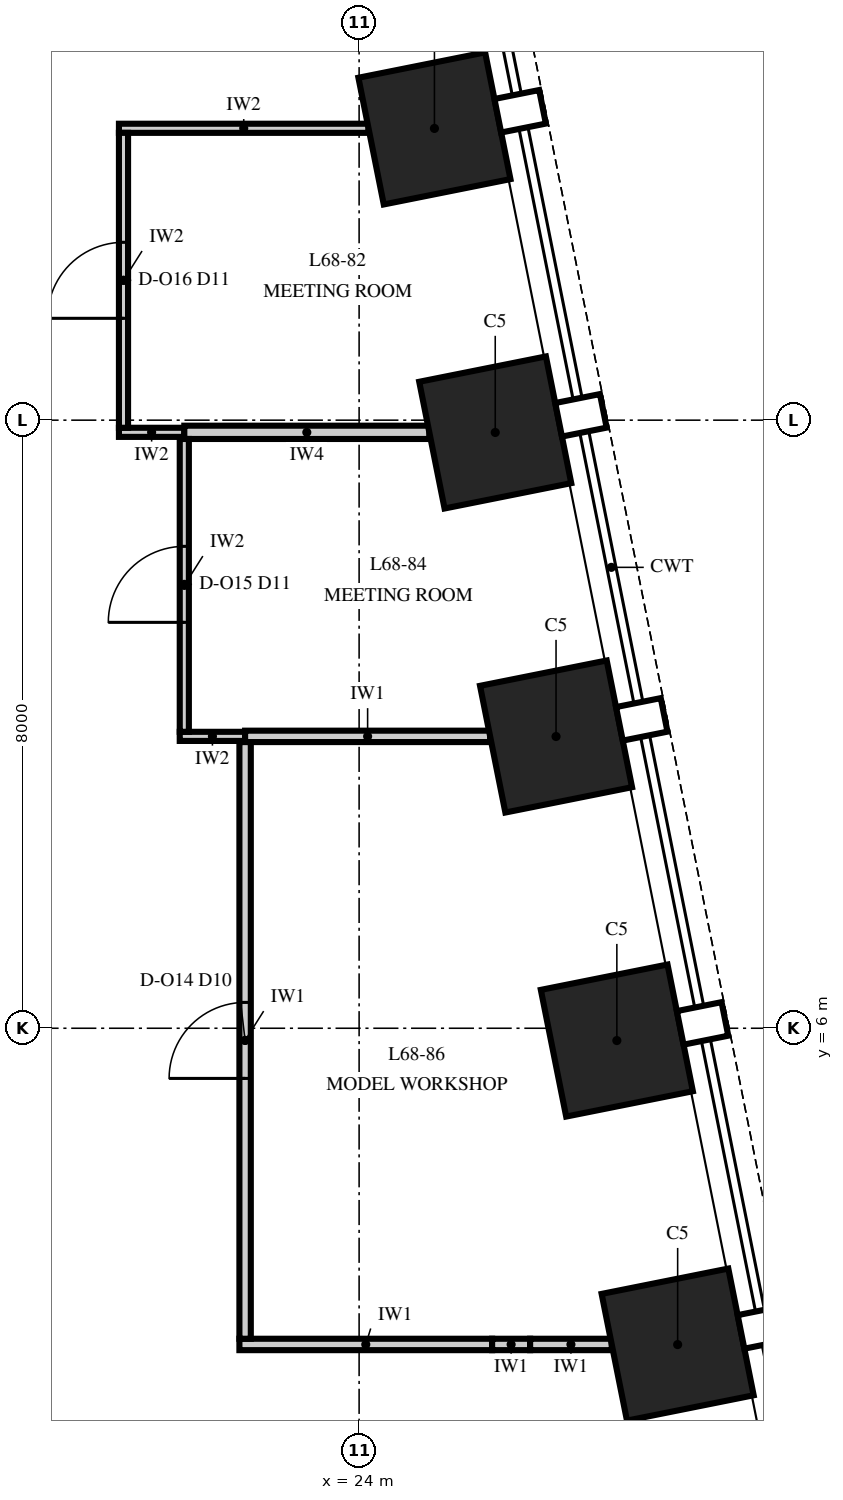
"""IFC4 building model, lengths in metres.
Left out: names, types, materials, properties, quantities, classifications, styles, units other than length and angle.
Written with IfcOpenShell. Run it as: python <this file> out.ifc"""

import sys

from ifc_helpers import new_model, si_unit, direction, frame, frame_2d, origin, origin_2d, place, context, subcontext, project, spatial, rectangle, extrude, element, fill, save


model = new_model("IFC4")
c1 = context("Model", 3, precision=1e-05, world=origin(), true_north=direction((0.0, 1.0)))
c2 = subcontext(c1, "Body", "Model", "MODEL_VIEW")
j1 = project(units=[si_unit("LENGTHUNIT", "METRE"), si_unit("PLANEANGLEUNIT", "RADIAN")], contexts=[c1])
p1 = place(None, origin())
s1 = spatial("IfcSite", under=j1, at=p1, CompositionType="ELEMENT")
p2 = place(p1, origin())
s2 = spatial("IfcBuilding", under=s1, at=p2, CompositionType="ELEMENT")
p3 = place(p2, frame((0.0, 0.0, 292.0)))
s3 = spatial("IfcBuildingStorey", under=s2, at=p3, CompositionType="ELEMENT", Elevation=292.0)
for number, where, z_axis, x_axis in (
    (1, (28.191, 1.838, 0.0), (0.0, 0.0, 1.0), (-0.196, 0.981, 0.0)),
    (2, (27.391, 5.838, 0.0), (0.0, 0.0, 1.0), (-0.196, 0.981, 0.0)),
    (3, (26.591, 9.838, 0.0), (0.0, 0.0, 1.0), (-0.196, 0.981, 0.0)),
    (4, (25.791, 13.838, 0.0), (0.0, 0.0, 1.0), (-0.196, 0.981, 0.0)),
    (5, (24.991, 17.838, 0.0), (0.0, 0.0, 1.0), (-0.196, 0.981, 0.0)),
):
    element("IfcColumn", number, at=place(p3, frame(where, z_axis=z_axis, x_axis=x_axis)), inside=s3, PredefinedType="COLUMN", context=c2, shape_type="SweptSolid", body=[
        extrude(rectangle(XDim=1.7, YDim=1.7, at=origin_2d()), origin(), (0.0, 0.0, 1.0), 4.0),
    ])
p4 = place(p3, frame((22.425, 1.84, 0.0), z_axis=(0.0, 0.0, 1.0), x_axis=(1.0, 0.0, 0.0)))
e6 = element("IfcWall", 6, at=p4, inside=s3, PredefinedType="PARTITIONING", context=c2, shape_type="SweptSolid", body=[
    extrude(rectangle(XDim=3.325, YDim=0.15, at=frame_2d((1.663, 0.0))), origin(), (0.0, 0.0, 1.0), 3.326),
])
p5 = place(p3, frame((25.75, 1.84, 0.0), z_axis=(0.0, 0.0, 1.0), x_axis=(1.0, 0.0, 0.0)))
e7 = element("IfcWall", 7, at=p5, inside=s3, PredefinedType="PARTITIONING", context=c2, shape_type="SweptSolid", body=[
    extrude(rectangle(XDim=0.5, YDim=0.15, at=frame_2d((0.25, 0.0))), origin(), (0.0, 0.0, 1.0), 2.15),
])
p6 = place(p3, frame((26.25, 1.84, 0.0), z_axis=(0.0, 0.0, 1.0), x_axis=(1.0, 0.0, 0.0)))
e8 = element("IfcWall", 8, at=p6, inside=s3, PredefinedType="PARTITIONING", context=c2, shape_type="SweptSolid", body=[
    extrude(rectangle(XDim=1.074, YDim=0.15, at=frame_2d((0.537, 0.0))), origin(), (0.0, 0.0, 1.0), 3.326),
])
p7 = place(p3, frame((21.64, 9.84, 0.0), z_axis=(0.0, 0.0, 1.0), x_axis=(1.0, 0.0, 0.0)))
e9 = element("IfcWall", 9, at=p7, inside=s3, PredefinedType="PARTITIONING", context=c2, shape_type="SweptSolid", body=[
    extrude(rectangle(XDim=0.86, YDim=0.12, at=frame_2d((0.43, 0.0))), origin(), (0.0, 0.0, 1.0), 3.85),
])
p8 = place(p3, frame((22.5, 9.84, 0.0), z_axis=(0.0, 0.0, 1.0), x_axis=(1.0, 0.0, 0.0)))
e10 = element("IfcWall", 10, at=p8, inside=s3, PredefinedType="PARTITIONING", context=c2, shape_type="SweptSolid", body=[
    extrude(rectangle(XDim=3.224, YDim=0.15, at=frame_2d((1.612, 0.0))), origin(), (0.0, 0.0, 1.0), 3.23),
])
p9 = place(p3, frame((20.84, 13.84, 0.0), z_axis=(0.0, 0.0, 1.0), x_axis=(1.0, 0.0, 0.0)))
e11 = element("IfcWall", 11, at=p9, inside=s3, PredefinedType="PARTITIONING", context=c2, shape_type="SweptSolid", body=[
    extrude(rectangle(XDim=0.86, YDim=0.12, at=frame_2d((0.43, 0.0))), origin(), (0.0, 0.0, 1.0), 3.85),
])
p10 = place(p3, frame((21.7, 13.84, 0.0), z_axis=(0.0, 0.0, 1.0), x_axis=(1.0, 0.0, 0.0)))
e12 = element("IfcWall", 12, at=p10, inside=s3, PredefinedType="PARTITIONING", context=c2, shape_type="SweptSolid", body=[
    extrude(rectangle(XDim=3.224, YDim=0.175, at=frame_2d((1.612, 0.0))), origin(), (0.0, 0.0, 1.0), 3.23),
])
p11 = place(p3, frame((20.84, 17.84, 0.0), z_axis=(0.0, 0.0, 1.0), x_axis=(1.0, 0.0, 0.0)))
e13 = element("IfcWall", 13, at=p11, inside=s3, PredefinedType="PARTITIONING", context=c2, shape_type="SweptSolid", body=[
    extrude(rectangle(XDim=3.284, YDim=0.12, at=frame_2d((1.642, 0.0))), origin(), (0.0, 0.0, 1.0), 3.23),
])
p12 = place(p3, frame((20.9, 13.9, 0.0), z_axis=(0.0, 0.0, 1.0), x_axis=(0.0, 1.0, 0.0)))
e14 = element("IfcWall", 14, at=p12, inside=s3, PredefinedType="PARTITIONING", context=c2, shape_type="SweptSolid", body=[
    extrude(rectangle(XDim=3.88, YDim=0.12, at=frame_2d((1.94, 0.0))), origin(), (0.0, 0.0, 1.0), 3.23),
])
p13 = place(p12, frame((1.44, 0.0, 0.0)))
e15 = element("IfcOpeningElement", 15, at=p13, cuts=e14, PredefinedType="OPENING", context=c2, shape_type="SweptSolid", body=[
    extrude(rectangle(XDim=1.0, YDim=2.4, at=frame_2d((0.5, 1.2))), frame((0.0, 0.075, 0.0), z_axis=(0.0, -1.0, 0.0), x_axis=(1.0, 0.0, 0.0)), (0.0, 0.0, 1.0), 0.15),
])
p14 = place(p3, frame((21.7, 9.9, 0.0), z_axis=(0.0, 0.0, 1.0), x_axis=(0.0, 1.0, 0.0)))
e16 = element("IfcWall", 16, at=p14, inside=s3, PredefinedType="PARTITIONING", context=c2, shape_type="SweptSolid", body=[
    extrude(rectangle(XDim=3.853, YDim=0.12, at=frame_2d((1.926, 0.0))), origin(), (0.0, 0.0, 1.0), 3.85),
])
p15 = place(p14, frame((1.44, 0.0, 0.0)))
e17 = element("IfcOpeningElement", 17, at=p15, cuts=e16, PredefinedType="OPENING", context=c2, shape_type="SweptSolid", body=[
    extrude(rectangle(XDim=1.0, YDim=2.4, at=frame_2d((0.5, 1.2))), frame((0.0, 0.075, 0.0), z_axis=(0.0, -1.0, 0.0), x_axis=(1.0, 0.0, 0.0)), (0.0, 0.0, 1.0), 0.15),
])
p16 = place(p3, frame((22.5, 1.915, 0.0), z_axis=(0.0, 0.0, 1.0), x_axis=(0.0, 1.0, 0.0)))
e18 = element("IfcWall", 18, at=p16, inside=s3, PredefinedType="PARTITIONING", context=c2, shape_type="SweptSolid", body=[
    extrude(rectangle(XDim=7.85, YDim=0.15, at=frame_2d((3.925, 0.0))), origin(), (0.0, 0.0, 1.0), 2.842),
])
p17 = place(p16, frame((3.425, 0.0, 0.0)))
e19 = element("IfcOpeningElement", 19, at=p17, cuts=e18, PredefinedType="OPENING", context=c2, shape_type="SweptSolid", body=[
    extrude(rectangle(XDim=1.0, YDim=2.3, at=frame_2d((0.5, 1.15))), frame((0.0, 0.09, 0.0), z_axis=(0.0, -1.0, 0.0), x_axis=(1.0, 0.0, 0.0)), (0.0, 0.0, 1.0), 0.18),
])
p18 = place(p17, origin())
e20 = element("IfcDoor", 20, at=p18, inside=s3, OperationType="SINGLE_SWING_LEFT", PredefinedType="DOOR", context=c2, shape_type="SweptSolid", body=[
    extrude(rectangle(XDim=1.0, YDim=2.3, at=frame_2d((0.5, 1.15))), frame((0.0, 0.075, 0.0), z_axis=(0.0, -1.0, 0.0), x_axis=(1.0, 0.0, 0.0)), (0.0, 0.0, 1.0), 0.149),
])
fill(e19, e20)
p19 = place(p15, origin())
e21 = element("IfcDoor", 21, at=p19, inside=s3, OperationType="SINGLE_SWING_RIGHT", PredefinedType="DOOR", context=c2, shape_type="SweptSolid", body=[
    extrude(rectangle(XDim=1.0, YDim=2.4, at=frame_2d((0.5, 1.2))), frame((0.0, 0.06, 0.0), z_axis=(0.0, -1.0, 0.0), x_axis=(1.0, 0.0, 0.0)), (0.0, 0.0, 1.0), 0.12),
])
fill(e17, e21)
p20 = place(p13, origin())
e22 = element("IfcDoor", 22, at=p20, inside=s3, OperationType="SINGLE_SWING_RIGHT", PredefinedType="DOOR", context=c2, shape_type="SweptSolid", body=[
    extrude(rectangle(XDim=1.0, YDim=2.4, at=frame_2d((0.5, 1.2))), frame((0.0, 0.06, 0.0), z_axis=(0.0, -1.0, 0.0), x_axis=(1.0, 0.0, 0.0)), (0.0, 0.0, 1.0), 0.12),
])
fill(e15, e22)
save(model, sys.argv[1])
